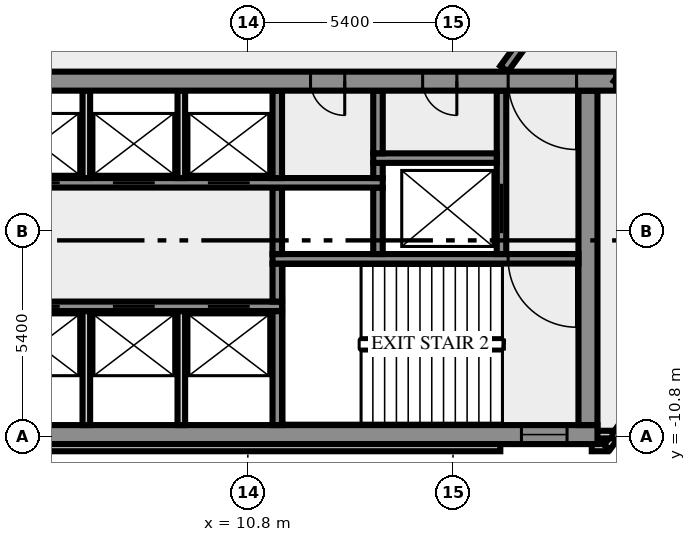
"""IFC4 building model, lengths in metres.
Left out: names, types, materials, properties, quantities, classifications, styles, units other than length and angle.
Written with IfcOpenShell. Run it as: python <this file> out.ifc"""

import sys

from ifc_helpers import new_model, si_unit, direction, frame, frame_2d, origin, place, context, subcontext, project, spatial, rectangle, extrude, element, fill, save


model = new_model("IFC4")
c1 = context("Model", 3, precision=1e-05, world=origin(), true_north=direction((0.0, 1.0)))
c2 = subcontext(c1, "Body", "Model", "MODEL_VIEW")
j1 = project(units=[si_unit("LENGTHUNIT", "METRE"), si_unit("PLANEANGLEUNIT", "RADIAN")], contexts=[c1])
p1 = place(None, origin())
s1 = spatial("IfcSite", under=j1, at=p1, CompositionType="ELEMENT")
p2 = place(p1, origin())
s2 = spatial("IfcBuilding", under=s1, at=p2, CompositionType="ELEMENT")
p3 = place(p2, frame((0.0, 0.0, 234.0)))
s3 = spatial("IfcBuildingStorey", under=s2, at=p3, CompositionType="ELEMENT", Elevation=234.0)
p4 = place(p3, frame((-17.444, -11.088, 0.0), z_axis=(0.0, 0.0, 1.0), x_axis=(1.0, 0.0, 0.0)))
e1 = element("IfcWall", 1, at=p4, inside=s3, PredefinedType="SOLIDWALL", context=c2, shape_type="SweptSolid", body=[
    extrude(rectangle(XDim=34.888, YDim=0.2, at=frame_2d((17.444, 0.0))), origin(), (0.0, 0.0, 1.0), 3.65),
])
p5 = place(p3, frame((19.85, -11.088, 0.0), z_axis=(0.0, 0.0, 1.0), x_axis=(1.0, 0.0, 0.0)))
e2 = element("IfcWall", 2, at=p5, inside=s3, PredefinedType="SOLIDWALL", context=c2, shape_type="SweptSolid", body=[
    extrude(rectangle(XDim=0.406, YDim=0.2, at=frame_2d((0.203, 0.0))), origin(), (0.0, 0.0, 1.0), 3.65),
])
p6 = place(p3, frame((20.253, -11.083, 0.0), z_axis=(0.0, 0.0, 1.0), x_axis=(0.587766567315, 0.809030569476, 0.0)))
e3 = element("IfcWall", 3, at=p6, inside=s3, PredefinedType="SOLIDWALL", context=c2, shape_type="SweptSolid", body=[
    extrude(rectangle(XDim=2.688, YDim=0.2, at=frame_2d((1.344, 0.0))), origin(), (0.0, 0.0, 1.0), 3.65),
])
p7 = place(p3, frame((19.98, -10.75, 0.0), z_axis=(0.0, 0.0, 1.0), x_axis=(1.0, 0.0, 0.0)))
e4 = element("IfcWall", 4, at=p7, inside=s3, PredefinedType="SOLIDWALL", context=c2, shape_type="SweptSolid", body=[
    extrude(rectangle(XDim=0.417, YDim=0.2, at=frame_2d((0.208, 0.0))), origin(), (0.0, 0.0, 1.0), 3.65),
])
p8 = place(p3, frame((-20.0, -10.75, 0.0), z_axis=(0.0, 0.0, 1.0), x_axis=(1.0, 0.0, 0.0)))
e5 = element("IfcWall", 5, at=p8, inside=s3, PredefinedType="SHEAR", context=c2, shape_type="SweptSolid", body=[
    extrude(rectangle(XDim=40.0, YDim=0.5, at=frame_2d((20.0, 0.0))), origin(), (0.0, 0.0, 1.0), 3.65),
])
p9 = place(p8, frame((0.8, 0.0, 1.0)))
e6 = element("IfcOpeningElement", 6, at=p9, cuts=e5, PredefinedType="OPENING", context=c2, shape_type="SweptSolid", body=[
    extrude(rectangle(XDim=1.2, YDim=1.2, at=frame_2d((0.6, 0.6))), frame((0.0, 0.26, 0.0), z_axis=(0.0, -1.0, 0.0), x_axis=(1.0, 0.0, 0.0)), (0.0, 0.0, 1.0), 0.52),
])
p10 = place(p8, frame((38.0, 0.0, 1.0)))
e7 = element("IfcOpeningElement", 7, at=p10, cuts=e5, PredefinedType="OPENING", context=c2, shape_type="SweptSolid", body=[
    extrude(rectangle(XDim=1.2, YDim=1.2, at=frame_2d((0.6, 0.6))), frame((0.0, 0.26, 0.0), z_axis=(0.0, -1.0, 0.0), x_axis=(1.0, 0.0, 0.0)), (0.0, 0.0, 1.0), 0.52),
])
for number, where, z_axis, x_axis in (
    (8, (6.55, -10.5, 0.0), (0.0, 0.0, 1.0), (0.0, 1.0, 0.0)),
    (9, (9.05, -10.5, 0.0), (0.0, 0.0, 1.0), (0.0, 1.0, 0.0)),
):
    element("IfcWall", number, at=place(p3, frame(where, z_axis=z_axis, x_axis=x_axis)), inside=s3, PredefinedType="SOLIDWALL", context=c2, shape_type="SweptSolid", body=[
        extrude(rectangle(XDim=3.0, YDim=0.2, at=frame_2d((1.5, 0.0))), origin(), (0.0, 0.0, 1.0), 3.65),
    ])
p11 = place(p3, frame((11.575, -10.5, 0.0), z_axis=(0.0, 0.0, 1.0), x_axis=(0.0, 1.0, 0.0)))
e10 = element("IfcWall", 10, at=p11, inside=s3, PredefinedType="SHEAR", context=c2, shape_type="SweptSolid", body=[
    extrude(rectangle(XDim=3.0, YDim=0.25, at=frame_2d((1.5, 0.0))), origin(), (0.0, 0.0, 1.0), 3.65),
])
p12 = place(p3, frame((19.75, -10.5, 0.0), z_axis=(0.0, 0.0, 1.0), x_axis=(0.0, 1.0, 0.0)))
e11 = element("IfcWall", 11, at=p12, inside=s3, PredefinedType="SHEAR", context=c2, shape_type="SweptSolid", body=[
    extrude(rectangle(XDim=8.8, YDim=0.5, at=frame_2d((4.4, 0.0))), origin(), (0.0, 0.0, 1.0), 3.65),
])
p13 = place(p3, frame((11.7, -7.375, 0.0), z_axis=(0.0, 0.0, 1.0), x_axis=(-1.0, 0.0, 0.0)))
e12 = element("IfcWall", 12, at=p13, inside=s3, PredefinedType="SHEAR", context=c2, shape_type="SweptSolid", body=[
    extrude(rectangle(XDim=23.4, YDim=0.25, at=frame_2d((11.7, 0.0))), origin(), (0.0, 0.0, 1.0), 3.65),
])
p14 = place(p13, frame((19.05, 0.0, 0.0)))
e13 = element("IfcOpeningElement", 13, at=p14, cuts=e12, PredefinedType="OPENING", context=c2, shape_type="SweptSolid", body=[
    extrude(rectangle(XDim=0.9, YDim=2.1, at=frame_2d((0.45, 1.05))), frame((0.0, 0.135, 0.0), z_axis=(0.0, -1.0, 0.0), x_axis=(1.0, 0.0, 0.0)), (0.0, 0.0, 1.0), 0.27),
])
p15 = place(p13, frame((14.55, 0.0, 0.0)))
e14 = element("IfcOpeningElement", 14, at=p15, cuts=e12, PredefinedType="OPENING", context=c2, shape_type="SweptSolid", body=[
    extrude(rectangle(XDim=0.8, YDim=2.1, at=frame_2d((0.4, 1.05))), frame((0.0, 0.135, 0.0), z_axis=(0.0, -1.0, 0.0), x_axis=(1.0, 0.0, 0.0)), (0.0, 0.0, 1.0), 0.27),
])
p16 = place(p13, frame((12.8, 0.0, 0.0)))
e15 = element("IfcOpeningElement", 15, at=p16, cuts=e12, PredefinedType="OPENING", context=c2, shape_type="SweptSolid", body=[
    extrude(rectangle(XDim=0.9, YDim=2.1, at=frame_2d((0.45, 1.05))), frame((0.0, 0.135, 0.0), z_axis=(0.0, -1.0, 0.0), x_axis=(1.0, 0.0, 0.0)), (0.0, 0.0, 1.0), 0.27),
])
p17 = place(p13, frame((10.7, 0.0, 0.0)))
e16 = element("IfcOpeningElement", 16, at=p17, cuts=e12, PredefinedType="OPENING", context=c2, shape_type="SweptSolid", body=[
    extrude(rectangle(XDim=0.9, YDim=2.1, at=frame_2d((0.45, 1.05))), frame((0.0, 0.135, 0.0), z_axis=(0.0, -1.0, 0.0), x_axis=(1.0, 0.0, 0.0)), (0.0, 0.0, 1.0), 0.27),
])
p18 = place(p13, frame((8.35, 0.0, 0.0)))
e17 = element("IfcOpeningElement", 17, at=p18, cuts=e12, PredefinedType="OPENING", context=c2, shape_type="SweptSolid", body=[
    extrude(rectangle(XDim=1.1, YDim=2.1, at=frame_2d((0.55, 1.05))), frame((0.0, 0.135, 0.0), z_axis=(0.0, -1.0, 0.0), x_axis=(1.0, 0.0, 0.0)), (0.0, 0.0, 1.0), 0.27),
])
p19 = place(p13, frame((5.85, 0.0, 0.0)))
e18 = element("IfcOpeningElement", 18, at=p19, cuts=e12, PredefinedType="OPENING", context=c2, shape_type="SweptSolid", body=[
    extrude(rectangle(XDim=1.1, YDim=2.1, at=frame_2d((0.55, 1.05))), frame((0.0, 0.135, 0.0), z_axis=(0.0, -1.0, 0.0), x_axis=(1.0, 0.0, 0.0)), (0.0, 0.0, 1.0), 0.27),
])
p20 = place(p13, frame((3.35, 0.0, 0.0)))
e19 = element("IfcOpeningElement", 19, at=p20, cuts=e12, PredefinedType="OPENING", context=c2, shape_type="SweptSolid", body=[
    extrude(rectangle(XDim=1.1, YDim=2.1, at=frame_2d((0.55, 1.05))), frame((0.0, 0.135, 0.0), z_axis=(0.0, -1.0, 0.0), x_axis=(1.0, 0.0, 0.0)), (0.0, 0.0, 1.0), 0.27),
])
p21 = place(p13, frame((0.85, 0.0, 0.0)))
e20 = element("IfcOpeningElement", 20, at=p21, cuts=e12, PredefinedType="OPENING", context=c2, shape_type="SweptSolid", body=[
    extrude(rectangle(XDim=1.1, YDim=2.1, at=frame_2d((0.55, 1.05))), frame((0.0, 0.135, 0.0), z_axis=(0.0, -1.0, 0.0), x_axis=(1.0, 0.0, 0.0)), (0.0, 0.0, 1.0), 0.27),
])
p22 = place(p3, frame((11.575, -7.25, 0.0), z_axis=(0.0, 0.0, 1.0), x_axis=(0.0, 1.0, 0.0)))
e21 = element("IfcWall", 21, at=p22, inside=s3, PredefinedType="SHEAR", context=c2, shape_type="SweptSolid", body=[
    extrude(rectangle(XDim=1.0, YDim=0.25, at=frame_2d((0.5, 0.0))), origin(), (0.0, 0.0, 1.0), 3.65),
])
p23 = place(p3, frame((19.5, -6.125, 0.0), z_axis=(0.0, 0.0, 1.0), x_axis=(-1.0, 0.0, 0.0)))
e22 = element("IfcWall", 22, at=p23, inside=s3, PredefinedType="SHEAR", context=c2, shape_type="SweptSolid", body=[
    extrude(rectangle(XDim=8.05, YDim=0.25, at=frame_2d((4.025, 0.0))), origin(), (0.0, 0.0, 1.0), 3.65),
])
p24 = place(p23, frame((0.05, 0.0, 0.0)))
e23 = element("IfcOpeningElement", 23, at=p24, cuts=e22, PredefinedType="OPENING", context=c2, shape_type="SweptSolid", body=[
    extrude(rectangle(XDim=1.8, YDim=2.1, at=frame_2d((0.9, 1.05))), frame((0.0, 0.135, 0.0), z_axis=(0.0, -1.0, 0.0), x_axis=(1.0, 0.0, 0.0)), (0.0, 0.0, 1.0), 0.27),
])
for number, where, z_axis, x_axis in (
    (24, (11.575, -6.0, 0.0), (0.0, 0.0, 1.0), (0.0, 1.0, 0.0)),
    (25, (14.225, -6.0, 0.0), (0.0, 0.0, 1.0), (0.0, 1.0, 0.0)),
):
    element("IfcWall", number, at=place(p3, frame(where, z_axis=z_axis, x_axis=x_axis)), inside=s3, PredefinedType="SHEAR", context=c2, shape_type="SweptSolid", body=[
        extrude(rectangle(XDim=1.75, YDim=0.25, at=frame_2d((0.875, 0.0))), origin(), (0.0, 0.0, 1.0), 3.65),
    ])
p25 = place(p3, frame((17.475, -6.0, 0.0), z_axis=(0.0, 0.0, 1.0), x_axis=(0.0, 1.0, 0.0)))
e26 = element("IfcWall", 26, at=p25, inside=s3, PredefinedType="SHEAR", context=c2, shape_type="SweptSolid", body=[
    extrude(rectangle(XDim=4.3, YDim=0.25, at=frame_2d((2.15, 0.0))), origin(), (0.0, 0.0, 1.0), 3.65),
])
p26 = place(p25, frame((0.55, 0.0, 0.0)))
e27 = element("IfcOpeningElement", 27, at=p26, cuts=e26, PredefinedType="OPENING", context=c2, shape_type="SweptSolid", body=[
    extrude(rectangle(XDim=1.3, YDim=2.1, at=frame_2d((0.65, 1.05))), frame((0.0, 0.135, 0.0), z_axis=(0.0, -1.0, 0.0), x_axis=(1.0, 0.0, 0.0)), (0.0, 0.0, 1.0), 0.27),
])
p27 = place(p3, frame((1.45, -4.125, 0.0), z_axis=(0.0, 0.0, 1.0), x_axis=(1.0, 0.0, 0.0)))
e28 = element("IfcWall", 28, at=p27, inside=s3, PredefinedType="SHEAR", context=c2, shape_type="SweptSolid", body=[
    extrude(rectangle(XDim=12.9, YDim=0.25, at=frame_2d((6.45, 0.0))), origin(), (0.0, 0.0, 1.0), 3.65),
])
p28 = place(p27, frame((0.7, 0.0, 0.0)))
e29 = element("IfcOpeningElement", 29, at=p28, cuts=e28, PredefinedType="OPENING", context=c2, shape_type="SweptSolid", body=[
    extrude(rectangle(XDim=1.3, YDim=2.1, at=frame_2d((0.65, 1.05))), frame((0.0, 0.135, 0.0), z_axis=(0.0, -1.0, 0.0), x_axis=(1.0, 0.0, 0.0)), (0.0, 0.0, 1.0), 0.27),
])
p29 = place(p27, frame((3.3, 0.0, 0.0)))
e30 = element("IfcOpeningElement", 30, at=p29, cuts=e28, PredefinedType="OPENING", context=c2, shape_type="SweptSolid", body=[
    extrude(rectangle(XDim=1.1, YDim=2.1, at=frame_2d((0.55, 1.05))), frame((0.0, 0.135, 0.0), z_axis=(0.0, -1.0, 0.0), x_axis=(1.0, 0.0, 0.0)), (0.0, 0.0, 1.0), 0.27),
])
p30 = place(p27, frame((5.8, 0.0, 0.0)))
e31 = element("IfcOpeningElement", 31, at=p30, cuts=e28, PredefinedType="OPENING", context=c2, shape_type="SweptSolid", body=[
    extrude(rectangle(XDim=1.1, YDim=2.1, at=frame_2d((0.55, 1.05))), frame((0.0, 0.135, 0.0), z_axis=(0.0, -1.0, 0.0), x_axis=(1.0, 0.0, 0.0)), (0.0, 0.0, 1.0), 0.27),
])
p31 = place(p27, frame((8.3, 0.0, 0.0)))
e32 = element("IfcOpeningElement", 32, at=p31, cuts=e28, PredefinedType="OPENING", context=c2, shape_type="SweptSolid", body=[
    extrude(rectangle(XDim=1.1, YDim=2.1, at=frame_2d((0.55, 1.05))), frame((0.0, 0.135, 0.0), z_axis=(0.0, -1.0, 0.0), x_axis=(1.0, 0.0, 0.0)), (0.0, 0.0, 1.0), 0.27),
])
for number, where, z_axis, x_axis in (
    (33, (6.55, -4.0, 0.0), (0.0, 0.0, 1.0), (0.0, 1.0, 0.0)),
    (34, (9.05, -4.0, 0.0), (0.0, 0.0, 1.0), (0.0, 1.0, 0.0)),
):
    element("IfcWall", number, at=place(p3, frame(where, z_axis=z_axis, x_axis=x_axis)), inside=s3, PredefinedType="SOLIDWALL", context=c2, shape_type="SweptSolid", body=[
        extrude(rectangle(XDim=2.3, YDim=0.2, at=frame_2d((1.15, 0.0))), origin(), (0.0, 0.0, 1.0), 3.65),
    ])
p32 = place(p3, frame((11.575, -4.0, 0.0), z_axis=(0.0, 0.0, 1.0), x_axis=(0.0, 1.0, 0.0)))
e35 = element("IfcWall", 35, at=p32, inside=s3, PredefinedType="SHEAR", context=c2, shape_type="SweptSolid", body=[
    extrude(rectangle(XDim=2.3, YDim=0.25, at=frame_2d((1.15, 0.0))), origin(), (0.0, 0.0, 1.0), 3.65),
])
p33 = place(p3, frame((14.225, -4.0, 0.0), z_axis=(0.0, 0.0, 1.0), x_axis=(0.0, 1.0, 0.0)))
e36 = element("IfcWall", 36, at=p33, inside=s3, PredefinedType="SHEAR", context=c2, shape_type="SweptSolid", body=[
    extrude(rectangle(XDim=0.4, YDim=0.25, at=frame_2d((0.2, 0.0))), origin(), (0.0, 0.0, 1.0), 3.65),
])
p34 = place(p3, frame((14.1, -3.475, 0.0), z_axis=(0.0, 0.0, 1.0), x_axis=(1.0, 0.0, 0.0)))
e37 = element("IfcWall", 37, at=p34, inside=s3, PredefinedType="SHEAR", context=c2, shape_type="SweptSolid", body=[
    extrude(rectangle(XDim=3.25, YDim=0.25, at=frame_2d((1.625, 0.0))), origin(), (0.0, 0.0, 1.0), 3.65),
])
p35 = place(p3, frame((14.225, -3.35, 0.0), z_axis=(0.0, 0.0, 1.0), x_axis=(0.0, 1.0, 0.0)))
e38 = element("IfcWall", 38, at=p35, inside=s3, PredefinedType="SHEAR", context=c2, shape_type="SweptSolid", body=[
    extrude(rectangle(XDim=1.65, YDim=0.25, at=frame_2d((0.825, 0.0))), origin(), (0.0, 0.0, 1.0), 3.65),
])
p36 = place(p3, frame((20.49, -1.45, 0.0), z_axis=(0.0, 0.0, 1.0), x_axis=(-1.0, 0.0, 0.0)))
e39 = element("IfcWall", 39, at=p36, inside=s3, PredefinedType="SHEAR", context=c2, shape_type="SweptSolid", body=[
    extrude(rectangle(XDim=40.98, YDim=0.5, at=frame_2d((20.49, 0.0))), origin(), (0.0, 0.0, 1.0), 3.65),
])
p37 = place(p36, frame((38.14, 0.0, 0.0)))
e40 = element("IfcOpeningElement", 40, at=p37, cuts=e39, PredefinedType="OPENING", context=c2, shape_type="SweptSolid", body=[
    extrude(rectangle(XDim=1.8, YDim=2.1, at=frame_2d((0.9, 1.05))), frame((0.0, 0.26, 0.0), z_axis=(0.0, -1.0, 0.0), x_axis=(1.0, 0.0, 0.0)), (0.0, 0.0, 1.0), 0.52),
])
p38 = place(p36, frame((36.728, 0.0, 0.0)))
e41 = element("IfcOpeningElement", 41, at=p38, cuts=e39, PredefinedType="OPENING", context=c2, shape_type="SweptSolid", body=[
    extrude(rectangle(XDim=0.8, YDim=2.1, at=frame_2d((0.4, 1.05))), frame((0.0, 0.26, 0.0), z_axis=(0.0, -1.0, 0.0), x_axis=(1.0, 0.0, 0.0)), (0.0, 0.0, 1.0), 0.52),
])
p39 = place(p36, frame((35.153, 0.0, 0.0)))
e42 = element("IfcOpeningElement", 42, at=p39, cuts=e39, PredefinedType="OPENING", context=c2, shape_type="SweptSolid", body=[
    extrude(rectangle(XDim=0.8, YDim=2.1, at=frame_2d((0.4, 1.05))), frame((0.0, 0.26, 0.0), z_axis=(0.0, -1.0, 0.0), x_axis=(1.0, 0.0, 0.0)), (0.0, 0.0, 1.0), 0.52),
])
p40 = place(p36, frame((32.94, 0.0, 0.0)))
e43 = element("IfcOpeningElement", 43, at=p40, cuts=e39, PredefinedType="OPENING", context=c2, shape_type="SweptSolid", body=[
    extrude(rectangle(XDim=0.9, YDim=2.1, at=frame_2d((0.45, 1.05))), frame((0.0, 0.26, 0.0), z_axis=(0.0, -1.0, 0.0), x_axis=(1.0, 0.0, 0.0)), (0.0, 0.0, 1.0), 0.52),
])
p41 = place(p36, frame((29.603, 0.0, 0.0)))
e44 = element("IfcOpeningElement", 44, at=p41, cuts=e39, PredefinedType="OPENING", context=c2, shape_type="SweptSolid", body=[
    extrude(rectangle(XDim=0.9, YDim=2.1, at=frame_2d((0.45, 1.05))), frame((0.0, 0.26, 0.0), z_axis=(0.0, -1.0, 0.0), x_axis=(1.0, 0.0, 0.0)), (0.0, 0.0, 1.0), 0.52),
])
p42 = place(p36, frame((25.877, 0.0, 0.0)))
e45 = element("IfcOpeningElement", 45, at=p42, cuts=e39, PredefinedType="OPENING", context=c2, shape_type="SweptSolid", body=[
    extrude(rectangle(XDim=0.9, YDim=2.1, at=frame_2d((0.45, 1.05))), frame((0.0, 0.26, 0.0), z_axis=(0.0, -1.0, 0.0), x_axis=(1.0, 0.0, 0.0)), (0.0, 0.0, 1.0), 0.52),
])
p43 = place(p36, frame((19.59, 0.0, 0.0)))
e46 = element("IfcOpeningElement", 46, at=p43, cuts=e39, PredefinedType="OPENING", context=c2, shape_type="SweptSolid", body=[
    extrude(rectangle(XDim=2.0, YDim=2.1, at=frame_2d((1.0, 1.05))), frame((0.0, 0.26, 0.0), z_axis=(0.0, -1.0, 0.0), x_axis=(1.0, 0.0, 0.0)), (0.0, 0.0, 1.0), 0.52),
])
p44 = place(p36, frame((7.14, 0.0, 0.0)))
e47 = element("IfcOpeningElement", 47, at=p44, cuts=e39, PredefinedType="OPENING", context=c2, shape_type="SweptSolid", body=[
    extrude(rectangle(XDim=0.9, YDim=2.1, at=frame_2d((0.45, 1.05))), frame((0.0, 0.26, 0.0), z_axis=(0.0, -1.0, 0.0), x_axis=(1.0, 0.0, 0.0)), (0.0, 0.0, 1.0), 0.52),
])
p45 = place(p36, frame((4.19, 0.0, 0.0)))
e48 = element("IfcOpeningElement", 48, at=p45, cuts=e39, PredefinedType="OPENING", context=c2, shape_type="SweptSolid", body=[
    extrude(rectangle(XDim=0.9, YDim=2.1, at=frame_2d((0.45, 1.05))), frame((0.0, 0.26, 0.0), z_axis=(0.0, -1.0, 0.0), x_axis=(1.0, 0.0, 0.0)), (0.0, 0.0, 1.0), 0.52),
])
p46 = place(p36, frame((1.04, 0.0, 0.0)))
e49 = element("IfcOpeningElement", 49, at=p46, cuts=e39, PredefinedType="OPENING", context=c2, shape_type="SweptSolid", body=[
    extrude(rectangle(XDim=1.8, YDim=2.1, at=frame_2d((0.9, 1.05))), frame((0.0, 0.26, 0.0), z_axis=(0.0, -1.0, 0.0), x_axis=(1.0, 0.0, 0.0)), (0.0, 0.0, 1.0), 0.52),
])
p47 = place(p3, frame((17.545, -1.125, 0.0), z_axis=(0.0, 0.0, 1.0), x_axis=(0.587796810203, 0.809008596935, 0.0)))
e50 = element("IfcWall", 50, at=p47, inside=s3, PredefinedType="SOLIDWALL", context=c2, shape_type="SweptSolid", body=[
    extrude(rectangle(XDim=12.703, YDim=0.25, at=frame_2d((6.352, 0.0))), origin(), (0.0, 0.0, 1.0), 3.65),
])
p48 = place(p47, frame((11.329, 0.0, 0.0)))
e51 = element("IfcOpeningElement", 51, at=p48, cuts=e50, PredefinedType="OPENING", context=c2, shape_type="SweptSolid", body=[
    extrude(rectangle(XDim=0.9, YDim=2.1, at=frame_2d((0.45, 1.05))), frame((0.0, 0.135, 0.0), z_axis=(0.0, -1.0, 0.0), x_axis=(1.0, 0.0, 0.0)), (0.0, 0.0, 1.0), 0.27),
])
p49 = place(p3, frame((27.009, 7.392, 0.0), z_axis=(0.0, 0.0, 1.0), x_axis=(-0.587776457057, -0.809023384414, 0.0)))
e52 = element("IfcWall", 52, at=p49, inside=s3, PredefinedType="SOLIDWALL", context=c2, shape_type="SweptSolid", body=[
    extrude(rectangle(XDim=11.021, YDim=0.25, at=frame_2d((5.51, 0.0))), origin(), (0.0, 0.0, 1.0), 3.65),
])
p50 = place(p49, frame((3.905, 0.0, 0.0)))
e53 = element("IfcOpeningElement", 53, at=p50, cuts=e52, PredefinedType="OPENING", context=c2, shape_type="SweptSolid", body=[
    extrude(rectangle(XDim=0.9, YDim=2.1, at=frame_2d((0.45, 1.05))), frame((0.0, 0.135, 0.0), z_axis=(0.0, -1.0, 0.0), x_axis=(1.0, 0.0, 0.0)), (0.0, 0.0, 1.0), 0.27),
])
p51 = place(p49, frame((0.225, 0.0, 0.0)))
e54 = element("IfcOpeningElement", 54, at=p51, cuts=e52, PredefinedType="OPENING", context=c2, shape_type="SweptSolid", body=[
    extrude(rectangle(XDim=0.9, YDim=2.1, at=frame_2d((0.45, 1.05))), frame((0.0, 0.135, 0.0), z_axis=(0.0, -1.0, 0.0), x_axis=(1.0, 0.0, 0.0)), (0.0, 0.0, 1.0), 0.27),
])
p52 = place(p10, origin())
e55 = element("IfcWindow", 55, at=p52, inside=s3, PartitioningType="SINGLE_PANEL", PredefinedType="WINDOW", context=c2, shape_type="SweptSolid", body=[
    extrude(rectangle(XDim=1.2, YDim=1.2, at=frame_2d((0.6, 0.6))), frame((0.0, 0.03, 0.0), z_axis=(0.0, -1.0, 0.0), x_axis=(1.0, 0.0, 0.0)), (0.0, 0.0, 1.0), 0.06),
])
fill(e7, e55)
p53 = place(p19, origin())
e56 = element("IfcDoor", 56, at=p53, inside=s3, OperationType="DOUBLE_DOOR_SLIDING", PredefinedType="DOOR", context=c2, shape_type="SweptSolid", body=[
    extrude(rectangle(XDim=1.1, YDim=2.1, at=frame_2d((0.55, 1.05))), frame((0.0, 0.025, 0.0), z_axis=(0.0, -1.0, 0.0), x_axis=(1.0, 0.0, 0.0)), (0.0, 0.0, 1.0), 0.05),
])
fill(e18, e56)
p54 = place(p20, origin())
e57 = element("IfcDoor", 57, at=p54, inside=s3, OperationType="DOUBLE_DOOR_SLIDING", PredefinedType="DOOR", context=c2, shape_type="SweptSolid", body=[
    extrude(rectangle(XDim=1.1, YDim=2.1, at=frame_2d((0.55, 1.05))), frame((0.0, 0.025, 0.0), z_axis=(0.0, -1.0, 0.0), x_axis=(1.0, 0.0, 0.0)), (0.0, 0.0, 1.0), 0.05),
])
fill(e19, e57)
p55 = place(p21, origin())
e58 = element("IfcDoor", 58, at=p55, inside=s3, OperationType="DOUBLE_DOOR_SLIDING", PredefinedType="DOOR", context=c2, shape_type="SweptSolid", body=[
    extrude(rectangle(XDim=1.1, YDim=2.1, at=frame_2d((0.55, 1.05))), frame((0.0, 0.025, 0.0), z_axis=(0.0, -1.0, 0.0), x_axis=(1.0, 0.0, 0.0)), (0.0, 0.0, 1.0), 0.05),
])
fill(e20, e58)
p56 = place(p24, origin())
e59 = element("IfcDoor", 59, at=p56, inside=s3, OperationType="DOUBLE_DOOR_SINGLE_SWING", PredefinedType="DOOR", context=c2, shape_type="SweptSolid", body=[
    extrude(rectangle(XDim=1.8, YDim=2.1, at=frame_2d((0.9, 1.05))), frame((0.0, 0.025, 0.0), z_axis=(0.0, -1.0, 0.0), x_axis=(1.0, 0.0, 0.0)), (0.0, 0.0, 1.0), 0.05),
])
fill(e23, e59)
p57 = place(p26, origin())
e60 = element("IfcDoor", 60, at=p57, inside=s3, OperationType="DOUBLE_DOOR_SLIDING", PredefinedType="DOOR", context=c2, shape_type="SweptSolid", body=[
    extrude(rectangle(XDim=1.3, YDim=2.1, at=frame_2d((0.65, 1.05))), frame((0.0, 0.025, 0.0), z_axis=(0.0, -1.0, 0.0), x_axis=(1.0, 0.0, 0.0)), (0.0, 0.0, 1.0), 0.05),
])
fill(e27, e60)
p58 = place(p29, origin())
e61 = element("IfcDoor", 61, at=p58, inside=s3, OperationType="DOUBLE_DOOR_SLIDING", PredefinedType="DOOR", context=c2, shape_type="SweptSolid", body=[
    extrude(rectangle(XDim=1.1, YDim=2.1, at=frame_2d((0.55, 1.05))), frame((0.0, 0.025, 0.0), z_axis=(0.0, -1.0, 0.0), x_axis=(1.0, 0.0, 0.0)), (0.0, 0.0, 1.0), 0.05),
])
fill(e30, e61)
p59 = place(p30, origin())
e62 = element("IfcDoor", 62, at=p59, inside=s3, OperationType="DOUBLE_DOOR_SLIDING", PredefinedType="DOOR", context=c2, shape_type="SweptSolid", body=[
    extrude(rectangle(XDim=1.1, YDim=2.1, at=frame_2d((0.55, 1.05))), frame((0.0, 0.025, 0.0), z_axis=(0.0, -1.0, 0.0), x_axis=(1.0, 0.0, 0.0)), (0.0, 0.0, 1.0), 0.05),
])
fill(e31, e62)
p60 = place(p31, origin())
e63 = element("IfcDoor", 63, at=p60, inside=s3, OperationType="DOUBLE_DOOR_SLIDING", PredefinedType="DOOR", context=c2, shape_type="SweptSolid", body=[
    extrude(rectangle(XDim=1.1, YDim=2.1, at=frame_2d((0.55, 1.05))), frame((0.0, 0.025, 0.0), z_axis=(0.0, -1.0, 0.0), x_axis=(1.0, 0.0, 0.0)), (0.0, 0.0, 1.0), 0.05),
])
fill(e32, e63)
p61 = place(p44, origin())
e64 = element("IfcDoor", 64, at=p61, inside=s3, OperationType="SINGLE_SWING_LEFT", PredefinedType="DOOR", context=c2, shape_type="SweptSolid", body=[
    extrude(rectangle(XDim=0.9, YDim=2.1, at=frame_2d((0.45, 1.05))), frame((0.0, 0.025, 0.0), z_axis=(0.0, -1.0, 0.0), x_axis=(1.0, 0.0, 0.0)), (0.0, 0.0, 1.0), 0.05),
])
fill(e47, e64)
p62 = place(p45, origin())
e65 = element("IfcDoor", 65, at=p62, inside=s3, OperationType="SINGLE_SWING_LEFT", PredefinedType="DOOR", context=c2, shape_type="SweptSolid", body=[
    extrude(rectangle(XDim=0.9, YDim=2.1, at=frame_2d((0.45, 1.05))), frame((0.0, 0.025, 0.0), z_axis=(0.0, -1.0, 0.0), x_axis=(1.0, 0.0, 0.0)), (0.0, 0.0, 1.0), 0.05),
])
fill(e48, e65)
p63 = place(p46, origin())
e66 = element("IfcDoor", 66, at=p63, inside=s3, OperationType="DOUBLE_DOOR_SINGLE_SWING", PredefinedType="DOOR", context=c2, shape_type="SweptSolid", body=[
    extrude(rectangle(XDim=1.8, YDim=2.1, at=frame_2d((0.9, 1.05))), frame((0.0, 0.025, 0.0), z_axis=(0.0, -1.0, 0.0), x_axis=(1.0, 0.0, 0.0)), (0.0, 0.0, 1.0), 0.05),
])
fill(e49, e66)
save(model, sys.argv[1])
